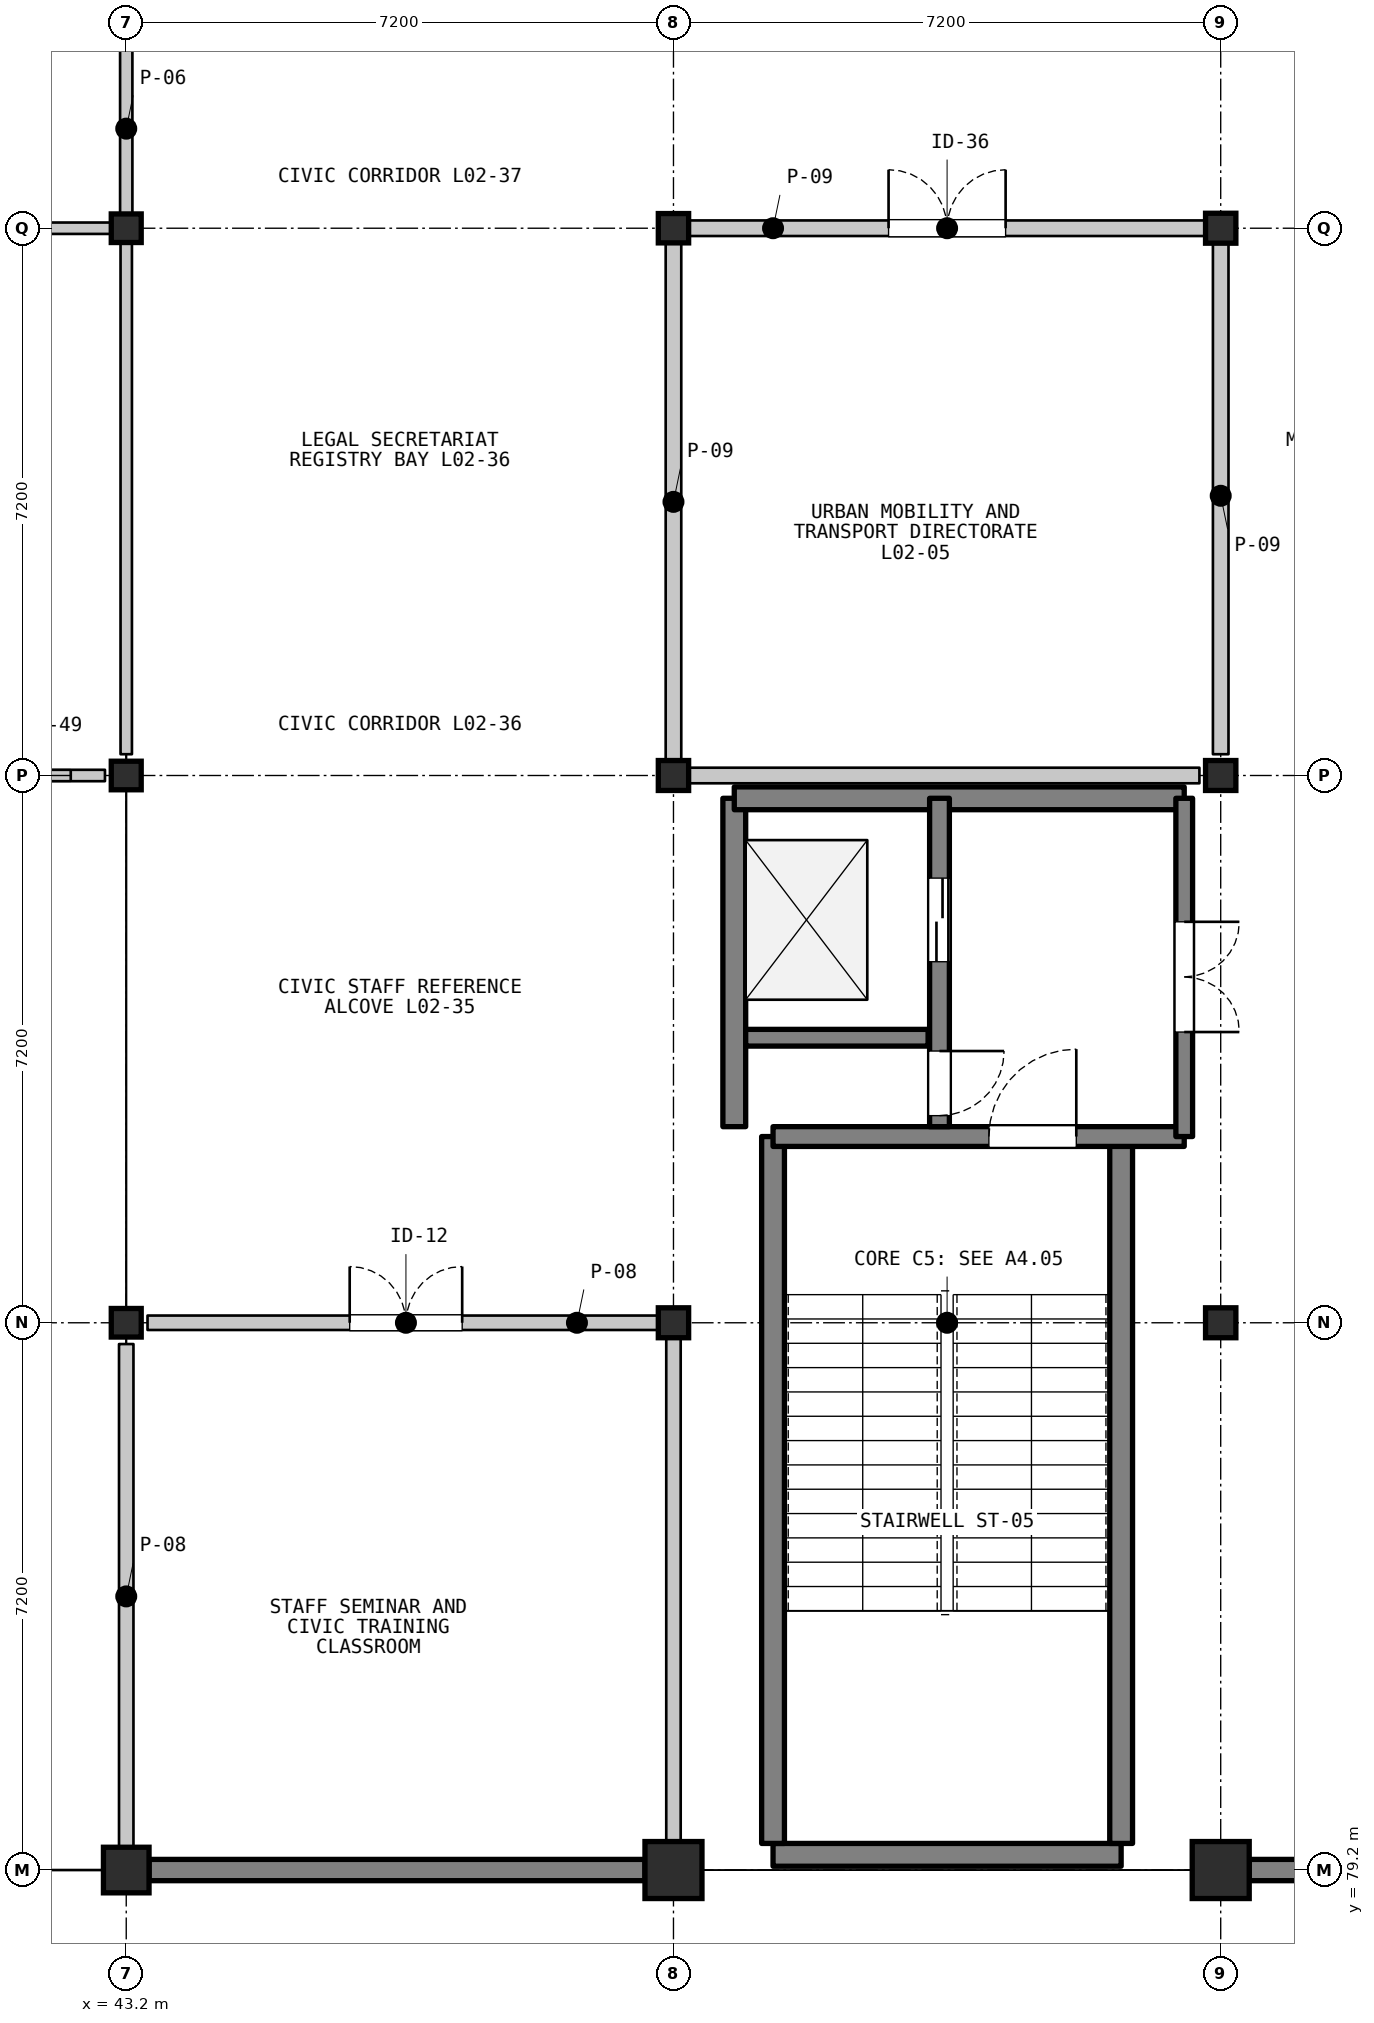
"""IFC4 building model, lengths in metres.
Left out: names, types, materials, properties, quantities, classifications, styles, units other than length and angle.
Written with IfcOpenShell. Run it as: python <this file> out.ifc"""

import sys

from ifc_helpers import new_model, si_unit, direction, frame, frame_2d, origin, origin_2d, place, context, subcontext, project, spatial, rectangle, i_section, extrude, element, fill, save


model = new_model("IFC4")
c1 = context("Model", 3, precision=1e-05, world=origin(), true_north=direction((0.0, 1.0)))
c2 = subcontext(c1, "Body", "Model", "MODEL_VIEW")
j1 = project(units=[si_unit("LENGTHUNIT", "METRE"), si_unit("PLANEANGLEUNIT", "RADIAN")], contexts=[c1])
p1 = place(None, origin())
s1 = spatial("IfcSite", under=j1, at=p1, CompositionType="ELEMENT")
p2 = place(p1, origin())
s2 = spatial("IfcBuilding", under=s1, at=p2, CompositionType="ELEMENT")
p3 = place(p2, frame((0.0, 0.0, 5.4)))
s3 = spatial("IfcBuildingStorey", under=s2, at=p3, CompositionType="ELEMENT", Elevation=5.4)
p4 = place(p3, frame((43.2, 79.2, 0.0), z_axis=(0.0, 0.0, 1.0), x_axis=(1.0, 0.0, 0.0)))
e1 = element("IfcColumn", 1, at=p4, inside=s3, PredefinedType="COLUMN", context=c2, shape_type="SweptSolid", body=[
    extrude(rectangle(XDim=0.6, YDim=0.6, at=origin_2d()), origin(), (0.0, 0.0, 1.0), 4.5),
])
for number, where, z_axis, x_axis in (
    (2, (43.2, 86.4, 0.0), (0.0, 0.0, 1.0), (1.0, 0.0, 0.0)),
    (3, (43.2, 93.6, 0.0), (0.0, 0.0, 1.0), (1.0, 0.0, 0.0)),
    (4, (43.2, 100.8, 0.0), (0.0, 0.0, 1.0), (1.0, 0.0, 0.0)),
):
    element("IfcColumn", number, at=place(p3, frame(where, z_axis=z_axis, x_axis=x_axis)), inside=s3, PredefinedType="COLUMN", context=c2, shape_type="SweptSolid", body=[
        extrude(i_section(OverallWidth=0.394, OverallDepth=0.376, WebThickness=0.017, FlangeThickness=0.028, FilletRadius=0.015, at=origin_2d()), origin(), (0.0, 0.0, 1.0), 4.5),
    ])
p5 = place(p3, frame((50.4, 79.2, 0.0), z_axis=(0.0, 0.0, 1.0), x_axis=(1.0, 0.0, 0.0)))
e5 = element("IfcColumn", 5, at=p5, inside=s3, PredefinedType="COLUMN", context=c2, shape_type="SweptSolid", body=[
    extrude(rectangle(XDim=0.75, YDim=0.75, at=origin_2d()), origin(), (0.0, 0.0, 1.0), 4.5),
])
for number, where, z_axis, x_axis in (
    (6, (50.4, 86.4, 0.0), (0.0, 0.0, 1.0), (1.0, 0.0, 0.0)),
    (7, (50.4, 93.6, 0.0), (0.0, 0.0, 1.0), (1.0, 0.0, 0.0)),
):
    element("IfcColumn", number, at=place(p3, frame(where, z_axis=z_axis, x_axis=x_axis)), inside=s3, PredefinedType="COLUMN", context=c2, shape_type="SweptSolid", body=[
        extrude(i_section(OverallWidth=0.399, OverallDepth=0.394, WebThickness=0.023, FlangeThickness=0.037, FilletRadius=0.015, at=origin_2d()), origin(), (0.0, 0.0, 1.0), 4.5),
    ])
p6 = place(p3, frame((50.4, 100.8, 0.0), z_axis=(0.0, 0.0, 1.0), x_axis=(1.0, 0.0, 0.0)))
e8 = element("IfcColumn", 8, at=p6, inside=s3, PredefinedType="COLUMN", context=c2, shape_type="SweptSolid", body=[
    extrude(i_section(OverallWidth=0.399, OverallDepth=0.386, WebThickness=0.021, FlangeThickness=0.033, FilletRadius=0.015, at=origin_2d()), origin(), (0.0, 0.0, 1.0), 4.5),
])
p7 = place(p3, frame((57.6, 79.2, 0.0), z_axis=(0.0, 0.0, 1.0), x_axis=(1.0, 0.0, 0.0)))
e9 = element("IfcColumn", 9, at=p7, inside=s3, PredefinedType="COLUMN", context=c2, shape_type="SweptSolid", body=[
    extrude(rectangle(XDim=0.75, YDim=0.75, at=origin_2d()), origin(), (0.0, 0.0, 1.0), 4.5),
])
for number, where, z_axis, x_axis in (
    (10, (57.6, 86.4, 0.0), (0.0, 0.0, 1.0), (1.0, 0.0, 0.0)),
    (11, (57.6, 93.6, 0.0), (0.0, 0.0, 1.0), (1.0, 0.0, 0.0)),
    (12, (57.6, 100.8, 0.0), (0.0, 0.0, 1.0), (1.0, 0.0, 0.0)),
):
    element("IfcColumn", number, at=place(p3, frame(where, z_axis=z_axis, x_axis=x_axis)), inside=s3, PredefinedType="COLUMN", context=c2, shape_type="SweptSolid", body=[
        extrude(i_section(OverallWidth=0.399, OverallDepth=0.394, WebThickness=0.023, FlangeThickness=0.037, FilletRadius=0.015, at=origin_2d()), origin(), (0.0, 0.0, 1.0), 4.5),
    ])
p8 = place(p3, frame((50.025, 79.2, 0.0), z_axis=(0.0, 0.0, 1.0), x_axis=(-1.0, 0.0, 0.0)))
e13 = element("IfcWall", 13, at=p8, inside=s3, PredefinedType="SOLIDWALL", context=c2, shape_type="SweptSolid", body=[
    extrude(rectangle(XDim=6.525, YDim=0.28, at=frame_2d((3.262, 0.0))), origin(), (0.0, 0.0, 1.0), 3.698),
])
p9 = place(p3, frame((64.425, 79.2, 0.0), z_axis=(0.0, 0.0, 1.0), x_axis=(-1.0, 0.0, 0.0)))
e14 = element("IfcWall", 14, at=p9, inside=s3, PredefinedType="SOLIDWALL", context=c2, shape_type="SweptSolid", body=[
    extrude(rectangle(XDim=6.45, YDim=0.28, at=frame_2d((3.225, 0.0))), origin(), (0.0, 0.0, 1.0), 3.698),
])
p10 = place(p3, frame((51.71, 79.4, 0.0), z_axis=(0.0, 0.0, 1.0), x_axis=(1.0, 0.0, 0.0)))
e15 = element("IfcWall", 15, at=p10, inside=s3, PredefinedType="SHEAR", context=c2, shape_type="SweptSolid", body=[
    extrude(rectangle(XDim=4.58, YDim=0.3, at=frame_2d((2.29, 0.0))), origin(), (0.0, 0.0, 1.0), 4.3),
])
for number, where, z_axis, x_axis in (
    (16, (51.71, 79.55, 0.0), (0.0, 0.0, 1.0), (0.0, 1.0, 0.0)),
    (17, (56.29, 79.55, 0.0), (0.0, 0.0, 1.0), (0.0, 1.0, 0.0)),
):
    element("IfcWall", number, at=place(p3, frame(where, z_axis=z_axis, x_axis=x_axis)), inside=s3, PredefinedType="SHEAR", context=c2, shape_type="SweptSolid", body=[
        extrude(rectangle(XDim=9.3, YDim=0.3, at=frame_2d((4.65, 0.0))), origin(), (0.0, 0.0, 1.0), 4.3),
    ])
p11 = place(p3, frame((51.71, 88.85, 0.0), z_axis=(0.0, 0.0, 1.0), x_axis=(1.0, 0.0, 0.0)))
e18 = element("IfcWall", 18, at=p11, inside=s3, PredefinedType="SHEAR", context=c2, shape_type="SweptSolid", body=[
    extrude(rectangle(XDim=5.41, YDim=0.26, at=frame_2d((2.705, 0.0))), origin(), (0.0, 0.0, 1.0), 4.3),
])
p12 = place(p11, frame((2.84, 0.0, 0.0)))
e19 = element("IfcOpeningElement", 19, at=p12, cuts=e18, PredefinedType="OPENING", context=c2, shape_type="SweptSolid", body=[
    extrude(rectangle(XDim=1.15, YDim=2.15, at=frame_2d((0.575, 1.075))), frame((0.0, 0.14, 0.0), z_axis=(0.0, -1.0, 0.0), x_axis=(1.0, 0.0, 0.0)), (0.0, 0.0, 1.0), 0.28),
])
p13 = place(p3, frame((51.2, 88.98, 0.0), z_axis=(0.0, 0.0, 1.0), x_axis=(0.0, 1.0, 0.0)))
e20 = element("IfcWall", 20, at=p13, inside=s3, PredefinedType="SHEAR", context=c2, shape_type="SweptSolid", body=[
    extrude(rectangle(XDim=4.32, YDim=0.3, at=frame_2d((2.16, 0.0))), origin(), (0.0, 0.0, 1.0), 4.3),
])
p14 = place(p3, frame((51.2, 93.3, 0.0), z_axis=(0.0, 0.0, 1.0), x_axis=(1.0, 0.0, 0.0)))
e21 = element("IfcWall", 21, at=p14, inside=s3, PredefinedType="SHEAR", context=c2, shape_type="SweptSolid", body=[
    extrude(rectangle(XDim=5.92, YDim=0.3, at=frame_2d((2.96, 0.0))), origin(), (0.0, 0.0, 1.0), 4.3),
])
p15 = place(p3, frame((51.35, 90.15, 0.0), z_axis=(0.0, 0.0, 1.0), x_axis=(1.0, 0.0, 0.0)))
e22 = element("IfcWall", 22, at=p15, inside=s3, PredefinedType="SHEAR", context=c2, shape_type="SweptSolid", body=[
    extrude(rectangle(XDim=2.4, YDim=0.22, at=frame_2d((1.2, 0.0))), origin(), (0.0, 0.0, 1.0), 4.3),
])
p16 = place(p3, frame((53.9, 93.3, 0.0), z_axis=(0.0, 0.0, 1.0), x_axis=(0.0, -1.0, 0.0)))
e23 = element("IfcWall", 23, at=p16, inside=s3, PredefinedType="SHEAR", context=c2, shape_type="SweptSolid", body=[
    extrude(rectangle(XDim=4.32, YDim=0.26, at=frame_2d((2.16, 0.0))), origin(), (0.0, 0.0, 1.0), 4.3),
])
p17 = place(p16, frame((1.05, 0.0, 0.0)))
e24 = element("IfcOpeningElement", 24, at=p17, cuts=e23, PredefinedType="OPENING", context=c2, shape_type="SweptSolid", body=[
    extrude(rectangle(XDim=1.1, YDim=2.15, at=frame_2d((0.55, 1.075))), frame((0.0, 0.14, 0.0), z_axis=(0.0, -1.0, 0.0), x_axis=(1.0, 0.0, 0.0)), (0.0, 0.0, 1.0), 0.28),
])
p18 = place(p16, frame((3.325, 0.0, 0.0)))
e25 = element("IfcOpeningElement", 25, at=p18, cuts=e23, PredefinedType="OPENING", context=c2, shape_type="SweptSolid", body=[
    extrude(rectangle(XDim=0.85, YDim=2.05, at=frame_2d((0.425, 1.025))), frame((0.0, 0.14, 0.0), z_axis=(0.0, -1.0, 0.0), x_axis=(1.0, 0.0, 0.0)), (0.0, 0.0, 1.0), 0.28),
])
p19 = place(p3, frame((57.12, 93.3, 0.0), z_axis=(0.0, 0.0, 1.0), x_axis=(0.0, -1.0, 0.0)))
e26 = element("IfcWall", 26, at=p19, inside=s3, PredefinedType="SHEAR", context=c2, shape_type="SweptSolid", body=[
    extrude(rectangle(XDim=4.45, YDim=0.22, at=frame_2d((2.225, 0.0))), origin(), (0.0, 0.0, 1.0), 4.3),
])
p20 = place(p19, frame((1.625, 0.0, 0.0)))
e27 = element("IfcOpeningElement", 27, at=p20, cuts=e26, PredefinedType="OPENING", context=c2, shape_type="SweptSolid", body=[
    extrude(rectangle(XDim=1.45, YDim=2.2, at=frame_2d((0.725, 1.1))), frame((0.0, 0.12, 0.0), z_axis=(0.0, -1.0, 0.0), x_axis=(1.0, 0.0, 0.0)), (0.0, 0.0, 1.0), 0.24),
])
p21 = place(p3, frame((42.92, 93.6, 0.0), z_axis=(0.0, 0.0, 1.0), x_axis=(-1.0, 0.0, 0.0)))
e28 = element("IfcWall", 28, at=p21, inside=s3, PredefinedType="PARTITIONING", context=c2, shape_type="SweptSolid", body=[
    extrude(rectangle(XDim=6.8, YDim=0.15, at=frame_2d((3.4, 0.0))), origin(), (0.0, 0.0, 1.0), 3.688),
])
p22 = place(p21, frame((2.74, 0.0, 0.0)))
e29 = element("IfcOpeningElement", 29, at=p22, cuts=e28, PredefinedType="OPENING", context=c2, shape_type="SweptSolid", body=[
    extrude(rectangle(XDim=1.32, YDim=2.24, at=frame_2d((0.66, 1.12))), frame((0.0, 0.085, 0.0), z_axis=(0.0, -1.0, 0.0), x_axis=(1.0, 0.0, 0.0)), (0.0, 0.0, 1.0), 0.17),
])
p23 = place(p21, frame((0.45, 0.0, 1.05)))
e30 = element("IfcOpeningElement", 30, at=p23, cuts=e28, PredefinedType="OPENING", context=c2, shape_type="SweptSolid", body=[
    extrude(rectangle(XDim=1.48, YDim=1.48, at=frame_2d((0.74, 0.74))), frame((0.0, 0.085, 0.0), z_axis=(0.0, -1.0, 0.0), x_axis=(1.0, 0.0, 0.0)), (0.0, 0.0, 1.0), 0.17),
])
p24 = place(p3, frame((36.12, 100.8, 0.0), z_axis=(0.0, 0.0, 1.0), x_axis=(1.0, 0.0, 0.0)))
e31 = element("IfcWall", 31, at=p24, inside=s3, PredefinedType="PARTITIONING", context=c2, shape_type="SweptSolid", body=[
    extrude(rectangle(XDim=6.96, YDim=0.15, at=frame_2d((3.48, 0.0))), origin(), (0.0, 0.0, 1.0), 3.688),
])
p25 = place(p3, frame((43.2, 100.68, 0.0), z_axis=(0.0, 0.0, 1.0), x_axis=(0.0, -1.0, 0.0)))
e32 = element("IfcWall", 32, at=p25, inside=s3, PredefinedType="PARTITIONING", context=c2, shape_type="SweptSolid", body=[
    extrude(rectangle(XDim=6.8, YDim=0.15, at=frame_2d((3.4, 0.0))), origin(), (0.0, 0.0, 1.0), 3.688),
])
p26 = place(p3, frame((43.2, 107.88, 0.0), z_axis=(0.0, 0.0, 1.0), x_axis=(0.0, -1.0, 0.0)))
e33 = element("IfcWall", 33, at=p26, inside=s3, PredefinedType="PARTITIONING", context=c2, shape_type="SweptSolid", body=[
    extrude(rectangle(XDim=6.96, YDim=0.162, at=frame_2d((3.48, 0.0))), origin(), (0.0, 0.0, 1.0), 3.688),
])
p27 = place(p26, frame((2.8, 0.0, 0.0)))
e34 = element("IfcOpeningElement", 34, at=p27, cuts=e33, PredefinedType="OPENING", context=c2, shape_type="SweptSolid", body=[
    extrude(rectangle(XDim=1.36, YDim=2.24, at=frame_2d((0.68, 1.12))), frame((0.0, 0.091, 0.0), z_axis=(0.0, -1.0, 0.0), x_axis=(1.0, 0.0, 0.0)), (0.0, 0.0, 1.0), 0.182),
])
p28 = place(p26, frame((0.45, 0.0, 1.05)))
e35 = element("IfcOpeningElement", 35, at=p28, cuts=e33, PredefinedType="OPENING", context=c2, shape_type="SweptSolid", body=[
    extrude(rectangle(XDim=1.58, YDim=1.48, at=frame_2d((0.79, 0.74))), frame((0.0, 0.091, 0.0), z_axis=(0.0, -1.0, 0.0), x_axis=(1.0, 0.0, 0.0)), (0.0, 0.0, 1.0), 0.182),
])
p29 = place(p3, frame((43.48, 86.4, 0.0), z_axis=(0.0, 0.0, 1.0), x_axis=(1.0, 0.0, 0.0)))
e36 = element("IfcWall", 36, at=p29, inside=s3, PredefinedType="PARTITIONING", context=c2, shape_type="SweptSolid", body=[
    extrude(rectangle(XDim=6.8, YDim=0.19, at=frame_2d((3.4, 0.0))), origin(), (0.0, 0.0, 1.0), 3.688),
])
p30 = place(p29, frame((2.66, 0.0, 0.0)))
e37 = element("IfcOpeningElement", 37, at=p30, cuts=e36, PredefinedType="OPENING", context=c2, shape_type="SweptSolid", body=[
    extrude(rectangle(XDim=1.48, YDim=2.25, at=frame_2d((0.74, 1.125))), frame((0.0, 0.105, 0.0), z_axis=(0.0, -1.0, 0.0), x_axis=(1.0, 0.0, 0.0)), (0.0, 0.0, 1.0), 0.21),
])
p31 = place(p3, frame((43.2, 79.48, 0.0), z_axis=(0.0, 0.0, 1.0), x_axis=(0.0, 1.0, 0.0)))
e38 = element("IfcWall", 38, at=p31, inside=s3, PredefinedType="PARTITIONING", context=c2, shape_type="SweptSolid", body=[
    extrude(rectangle(XDim=6.64, YDim=0.19, at=frame_2d((3.32, 0.0))), origin(), (0.0, 0.0, 1.0), 3.757),
])
p32 = place(p3, frame((50.4, 86.28, 0.0), z_axis=(0.0, 0.0, 1.0), x_axis=(0.0, -1.0, 0.0)))
e39 = element("IfcWall", 39, at=p32, inside=s3, PredefinedType="PARTITIONING", context=c2, shape_type="SweptSolid", body=[
    extrude(rectangle(XDim=6.96, YDim=0.19, at=frame_2d((3.48, 0.0))), origin(), (0.0, 0.0, 1.0), 3.688),
])
p33 = place(p3, frame((50.52, 100.8, 0.0), z_axis=(0.0, 0.0, 1.0), x_axis=(1.0, 0.0, 0.0)))
e40 = element("IfcWall", 40, at=p33, inside=s3, PredefinedType="PARTITIONING", context=c2, shape_type="SweptSolid", body=[
    extrude(rectangle(XDim=6.96, YDim=0.205, at=frame_2d((3.48, 0.0))), origin(), (0.0, 0.0, 1.0), 3.688),
])
p34 = place(p33, frame((2.71, 0.0, 0.0)))
e41 = element("IfcOpeningElement", 41, at=p34, cuts=e40, PredefinedType="OPENING", context=c2, shape_type="SweptSolid", body=[
    extrude(rectangle(XDim=1.54, YDim=2.28, at=frame_2d((0.77, 1.14))), frame((0.0, 0.113, 0.0), z_axis=(0.0, -1.0, 0.0), x_axis=(1.0, 0.0, 0.0)), (0.0, 0.0, 1.0), 0.225),
])
p35 = place(p3, frame((57.32, 93.6, 0.0), z_axis=(0.0, 0.0, 1.0), x_axis=(-1.0, 0.0, 0.0)))
e42 = element("IfcWall", 42, at=p35, inside=s3, PredefinedType="PARTITIONING", context=c2, shape_type="SweptSolid", body=[
    extrude(rectangle(XDim=6.8, YDim=0.205, at=frame_2d((3.4, 0.0))), origin(), (0.0, 0.0, 1.0), 3.688),
])
p36 = place(p3, frame((50.4, 93.72, 0.0), z_axis=(0.0, 0.0, 1.0), x_axis=(0.0, 1.0, 0.0)))
e43 = element("IfcWall", 43, at=p36, inside=s3, PredefinedType="PARTITIONING", context=c2, shape_type="SweptSolid", body=[
    extrude(rectangle(XDim=6.96, YDim=0.205, at=frame_2d((3.48, 0.0))), origin(), (0.0, 0.0, 1.0), 3.688),
])
p37 = place(p3, frame((57.6, 100.68, 0.0), z_axis=(0.0, 0.0, 1.0), x_axis=(0.0, -1.0, 0.0)))
e44 = element("IfcWall", 44, at=p37, inside=s3, PredefinedType="PARTITIONING", context=c2, shape_type="SweptSolid", body=[
    extrude(rectangle(XDim=6.8, YDim=0.205, at=frame_2d((3.4, 0.0))), origin(), (0.0, 0.0, 1.0), 3.688),
])
p38 = place(p12, origin())
e45 = element("IfcDoor", 45, at=p38, inside=s3, OperationType="SINGLE_SWING_RIGHT", PredefinedType="DOOR", context=c2, shape_type="SweptSolid", body=[
    extrude(rectangle(XDim=1.15, YDim=2.15, at=frame_2d((0.575, 1.075))), frame((0.0, 0.025, 0.0), z_axis=(0.0, -1.0, 0.0), x_axis=(1.0, 0.0, 0.0)), (0.0, 0.0, 1.0), 0.05),
])
fill(e19, e45)
p39 = place(p17, origin())
e46 = element("IfcDoor", 46, at=p39, inside=s3, OperationType="DOUBLE_DOOR_SLIDING", PredefinedType="DOOR", context=c2, shape_type="SweptSolid", body=[
    extrude(rectangle(XDim=1.1, YDim=2.15, at=frame_2d((0.55, 1.075))), frame((0.0, 0.025, 0.0), z_axis=(0.0, -1.0, 0.0), x_axis=(1.0, 0.0, 0.0)), (0.0, 0.0, 1.0), 0.05),
])
fill(e24, e46)
p40 = place(p18, origin())
e47 = element("IfcDoor", 47, at=p40, inside=s3, OperationType="SINGLE_SWING_LEFT", PredefinedType="DOOR", context=c2, shape_type="SweptSolid", body=[
    extrude(rectangle(XDim=0.85, YDim=2.05, at=frame_2d((0.425, 1.025))), frame((0.0, 0.025, 0.0), z_axis=(0.0, -1.0, 0.0), x_axis=(1.0, 0.0, 0.0)), (0.0, 0.0, 1.0), 0.05),
])
fill(e25, e47)
p41 = place(p20, origin())
e48 = element("IfcDoor", 48, at=p41, inside=s3, OperationType="DOUBLE_DOOR_SINGLE_SWING", PredefinedType="DOOR", context=c2, shape_type="SweptSolid", body=[
    extrude(rectangle(XDim=1.45, YDim=2.2, at=frame_2d((0.725, 1.1))), frame((0.0, 0.025, 0.0), z_axis=(0.0, -1.0, 0.0), x_axis=(1.0, 0.0, 0.0)), (0.0, 0.0, 1.0), 0.05),
])
fill(e27, e48)
p42 = place(p23, origin())
e49 = element("IfcWindow", 49, at=p42, inside=s3, PartitioningType="SINGLE_PANEL", PredefinedType="WINDOW", context=c2, shape_type="SweptSolid", body=[
    extrude(rectangle(XDim=1.48, YDim=1.48, at=frame_2d((0.74, 0.74))), frame((0.0, 0.03, 0.0), z_axis=(0.0, -1.0, 0.0), x_axis=(1.0, 0.0, 0.0)), (0.0, 0.0, 1.0), 0.06),
])
fill(e30, e49)
p43 = place(p30, origin())
e50 = element("IfcDoor", 50, at=p43, inside=s3, OperationType="DOUBLE_DOOR_SINGLE_SWING", PredefinedType="DOOR", context=c2, shape_type="SweptSolid", body=[
    extrude(rectangle(XDim=1.48, YDim=2.25, at=frame_2d((0.74, 1.125))), frame((0.0, 0.025, 0.0), z_axis=(0.0, -1.0, 0.0), x_axis=(1.0, 0.0, 0.0)), (0.0, 0.0, 1.0), 0.05),
])
fill(e37, e50)
p44 = place(p34, origin())
e51 = element("IfcDoor", 51, at=p44, inside=s3, OperationType="DOUBLE_DOOR_SINGLE_SWING", PredefinedType="DOOR", context=c2, shape_type="SweptSolid", body=[
    extrude(rectangle(XDim=1.54, YDim=2.28, at=frame_2d((0.77, 1.14))), frame((0.0, 0.025, 0.0), z_axis=(0.0, -1.0, 0.0), x_axis=(1.0, 0.0, 0.0)), (0.0, 0.0, 1.0), 0.05),
])
fill(e41, e51)
save(model, sys.argv[1])
